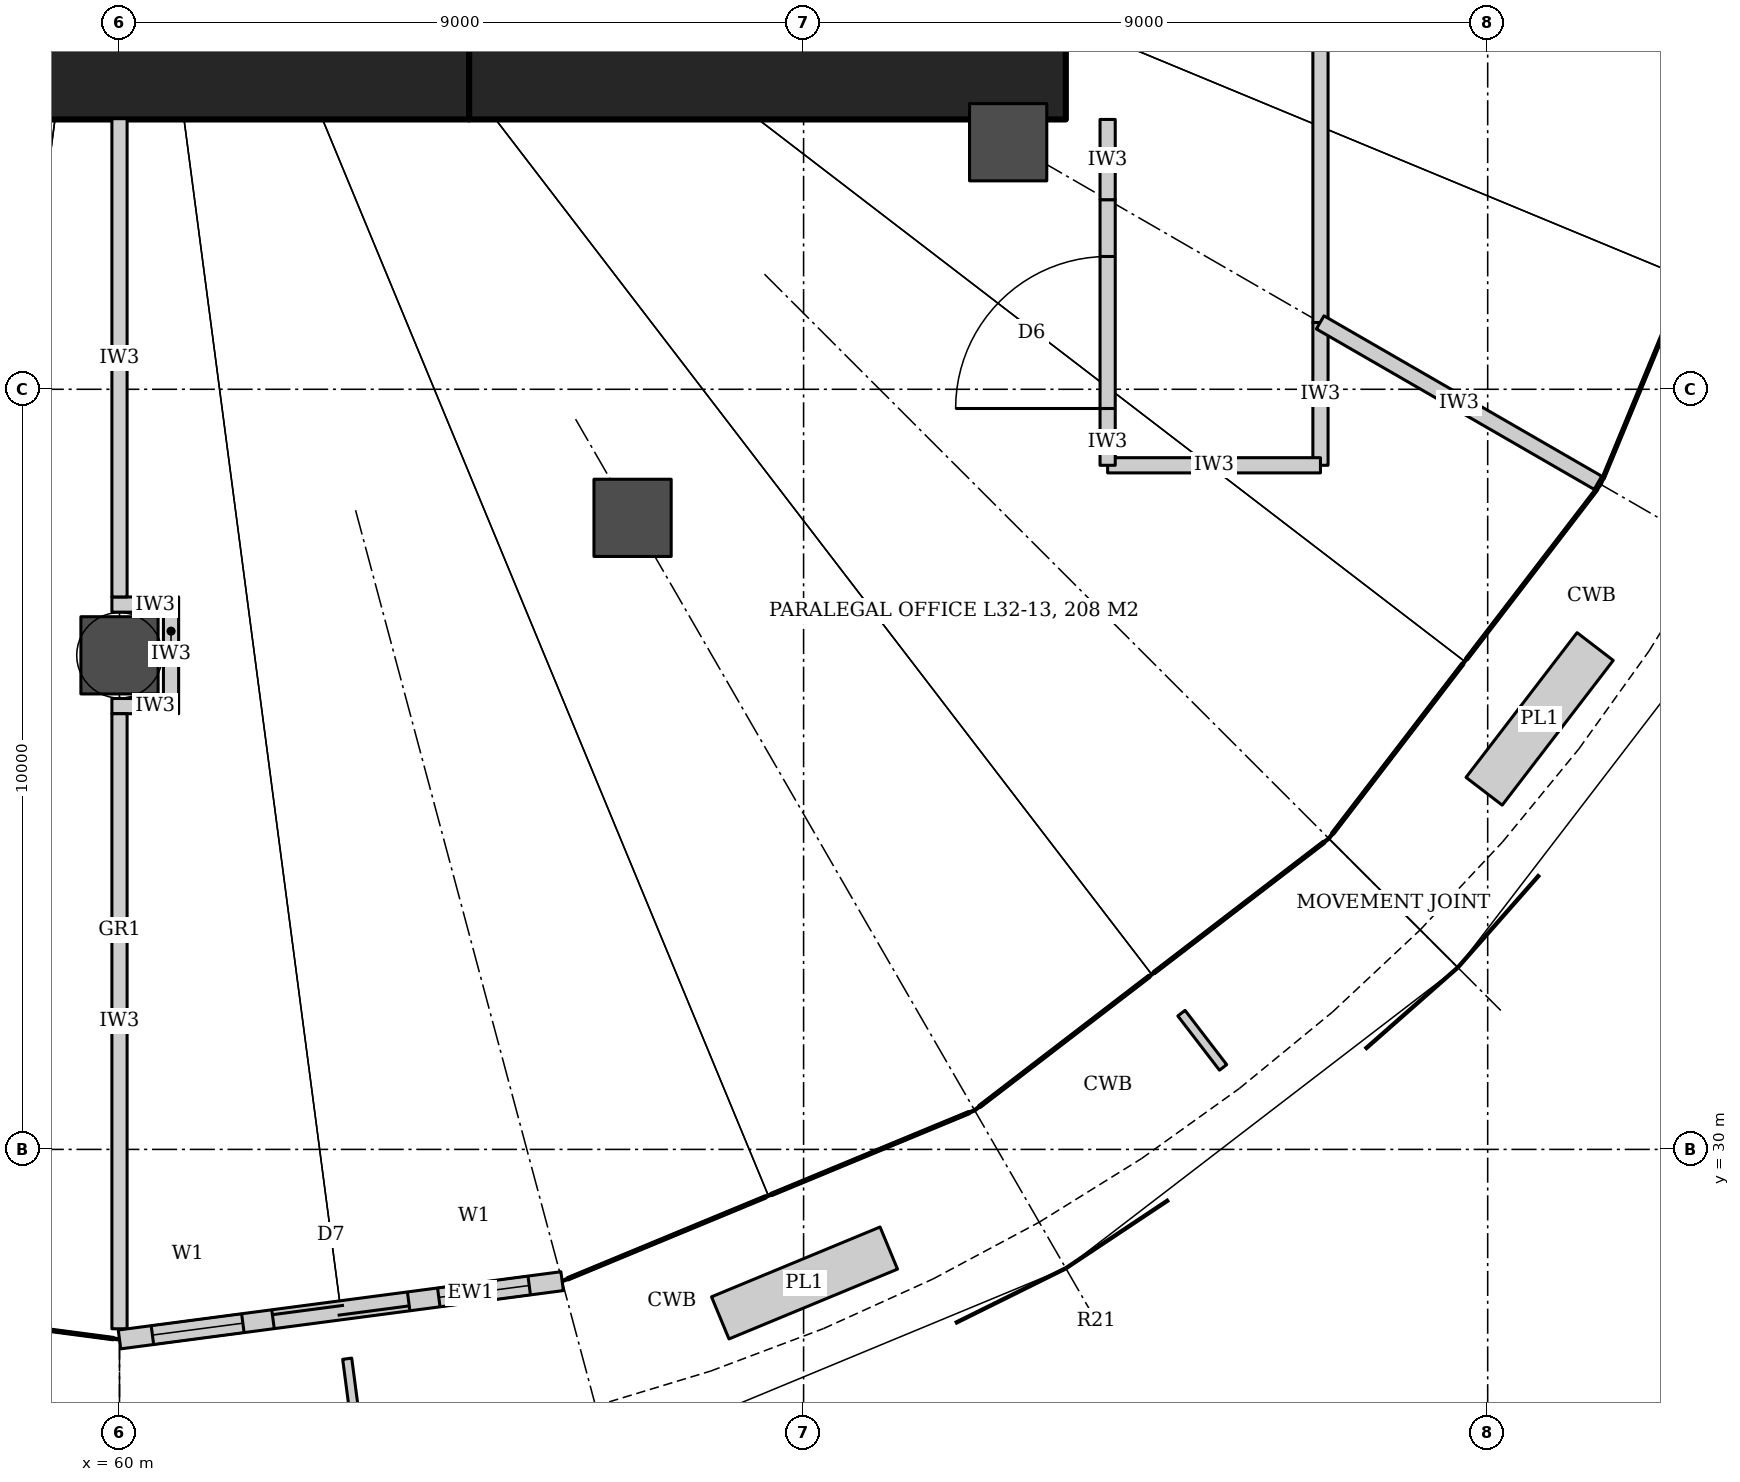
"""IFC4 building model, lengths in metres.
Left out: names, types, materials, properties, quantities, classifications, styles, units other than length and angle.
Written with IfcOpenShell. Run it as: python <this file> out.ifc"""

import sys

from ifc_helpers import new_model, si_unit, direction, frame, frame_2d, origin, origin_2d, place, context, subcontext, project, spatial, rectangle, hollow_circle, extrude, element, fill, save


model = new_model("IFC4")
c1 = context("Model", 3, precision=1e-05, world=origin(), true_north=direction((0.0, 1.0)))
c2 = subcontext(c1, "Body", "Model", "MODEL_VIEW")
j1 = project(units=[si_unit("LENGTHUNIT", "METRE"), si_unit("PLANEANGLEUNIT", "RADIAN")], contexts=[c1])
p1 = place(None, origin())
s1 = spatial("IfcSite", under=j1, at=p1, CompositionType="ELEMENT")
p2 = place(p1, origin())
s2 = spatial("IfcBuilding", under=s1, at=p2, CompositionType="ELEMENT")
p3 = place(p2, frame((0.0, 0.0, 135.2)))
s3 = spatial("IfcBuildingStorey", under=s2, at=p3, CompositionType="ELEMENT", Elevation=135.2)
p4 = place(p3, frame((55.4, 44.45, 0.0), z_axis=(0.0, 0.0, 1.0), x_axis=(1.0, 0.0, 0.0)))
e1 = element("IfcWall", 1, at=p4, inside=s3, PredefinedType="SHEAR", context=c2, shape_type="SweptSolid", body=[
    extrude(rectangle(XDim=9.2, YDim=1.8, at=frame_2d((4.6, 0.0))), origin(), (0.0, 0.0, 1.0), 4.2),
])
p5 = place(p3, frame((64.6, 44.45, 0.0), z_axis=(0.0, 0.0, 1.0), x_axis=(1.0, 0.0, 0.0)))
e2 = element("IfcWall", 2, at=p5, inside=s3, PredefinedType="SHEAR", context=c2, shape_type="SweptSolid", body=[
    extrude(rectangle(XDim=7.85, YDim=1.8, at=frame_2d((3.925, 0.0))), origin(), (0.0, 0.0, 1.0), 4.2),
])
for number, where, z_axis, x_axis in (
    (3, (60.0, 36.5, 0.0), (0.0, 0.0, 1.0), (1.0, 0.0, 0.0)),
    (4, (66.75, 38.309, 0.0), (0.0, 0.0, 1.0), (1.0, 0.0, 0.0)),
    (5, (71.691, 43.25, 0.0), (0.0, 0.0, 1.0), (1.0, 0.0, 0.0)),
):
    element("IfcColumn", number, at=place(p3, frame(where, z_axis=z_axis, x_axis=x_axis)), inside=s3, PredefinedType="COLUMN", context=c2, shape_type="SweptSolid", body=[
        extrude(hollow_circle(Radius=0.508, WallThickness=0.05, at=origin_2d()), origin(), (0.0, 0.0, 1.0), 4.2),
    ])
p6 = place(p3, frame((75.8, 50.0, 0.0), z_axis=(0.0, 0.0, 1.0), x_axis=(0.0, -1.0, 0.0)))
e6 = element("IfcWall", 6, at=p6, inside=s3, PredefinedType="PARTITIONING", context=c2, shape_type="SweptSolid", body=[
    extrude(rectangle(XDim=9.122, YDim=0.2, at=frame_2d((4.561, 0.0))), origin(), (0.0, 0.0, 1.0), 3.04),
])
p7 = place(p6, frame((4.061, 0.0, 0.0)))
e7 = element("IfcOpeningElement", 7, at=p7, cuts=e6, PredefinedType="OPENING", context=c2, shape_type="SweptSolid", body=[
    extrude(rectangle(XDim=1.0, YDim=2.1, at=frame_2d((0.5, 1.05))), frame((0.0, 0.11, 0.0), z_axis=(0.0, -1.0, 0.0), x_axis=(1.0, 0.0, 0.0)), (0.0, 0.0, 1.0), 0.22),
])
p8 = place(p3, frame((75.8, 40.878, 0.0), z_axis=(0.0, 0.0, 1.0), x_axis=(0.0, -1.0, 0.0)))
e8 = element("IfcWall", 8, at=p8, inside=s3, PredefinedType="PARTITIONING", context=c2, shape_type="SweptSolid", body=[
    extrude(rectangle(XDim=1.878, YDim=0.2, at=frame_2d((0.939, 0.0))), origin(), (0.0, 0.0, 1.0), 3.04),
])
p9 = place(p3, frame((75.8, 39.0, 0.0), z_axis=(0.0, 0.0, 1.0), x_axis=(-1.0, 0.0, 0.0)))
e9 = element("IfcWall", 9, at=p9, inside=s3, PredefinedType="PARTITIONING", context=c2, shape_type="SweptSolid", body=[
    extrude(rectangle(XDim=2.8, YDim=0.2, at=frame_2d((1.4, 0.0))), origin(), (0.0, 0.0, 1.0), 3.04),
])
p10 = place(p3, frame((73.0, 39.0, 0.0), z_axis=(0.0, 0.0, 1.0), x_axis=(0.0, 1.0, 0.0)))
e10 = element("IfcWall", 10, at=p10, inside=s3, PredefinedType="PARTITIONING", context=c2, shape_type="SweptSolid", body=[
    extrude(rectangle(XDim=3.494, YDim=0.2, at=frame_2d((1.747, 0.0))), origin(), (0.0, 0.0, 1.0), 3.04),
])
p11 = place(p10, frame((0.747, 0.0, 0.0)))
e11 = element("IfcOpeningElement", 11, at=p11, cuts=e10, PredefinedType="OPENING", context=c2, shape_type="SweptSolid", body=[
    extrude(rectangle(XDim=2.0, YDim=2.1, at=frame_2d((1.0, 1.05))), frame((0.0, 0.11, 0.0), z_axis=(0.0, -1.0, 0.0), x_axis=(1.0, 0.0, 0.0)), (0.0, 0.0, 1.0), 0.22),
])
p12 = place(p3, frame((73.0, 42.494, 0.0), z_axis=(0.0, 0.0, 1.0), x_axis=(0.0, 1.0, 0.0)))
e12 = element("IfcWall", 12, at=p12, inside=s3, PredefinedType="PARTITIONING", context=c2, shape_type="SweptSolid", body=[
    extrude(rectangle(XDim=1.056, YDim=0.2, at=frame_2d((0.528, 0.0))), origin(), (0.0, 0.0, 1.0), 3.04),
])
for number, where, z_axis, x_axis in (
    (13, (59.9, 37.168, 0.0), (0.0, 0.0, 1.0), (1.0, 0.0, 0.0)),
    (14, (59.9, 35.832, 0.0), (0.0, 0.0, 1.0), (1.0, 0.0, 0.0)),
):
    element("IfcWall", number, at=place(p3, frame(where, z_axis=z_axis, x_axis=x_axis)), inside=s3, PredefinedType="PARTITIONING", context=c2, shape_type="SweptSolid", body=[
        extrude(rectangle(XDim=0.878, YDim=0.2, at=frame_2d((0.439, 0.0))), origin(), (0.0, 0.0, 1.0), 3.02),
    ])
p13 = place(p3, frame((60.678, 37.068, 0.0), z_axis=(0.0, 0.0, 1.0), x_axis=(0.0, -1.0, 0.0)))
e15 = element("IfcWall", 15, at=p13, inside=s3, PredefinedType="PARTITIONING", context=c2, shape_type="SweptSolid", body=[
    extrude(rectangle(XDim=1.136, YDim=0.2, at=frame_2d((0.568, 0.0))), origin(), (0.0, 0.0, 1.0), 3.02),
])
p14 = place(p3, frame((60.0, 43.56, 0.0), z_axis=(0.0, 0.0, 1.0), x_axis=(0.0, -1.0, 0.0)))
e16 = element("IfcWall", 16, at=p14, inside=s3, PredefinedType="PARTITIONING", context=c2, shape_type="SweptSolid", body=[
    extrude(rectangle(XDim=6.292, YDim=0.2, at=frame_2d((3.146, 0.0))), origin(), (0.0, 0.0, 1.0), 3.04),
])
p15 = place(p3, frame((60.0, 35.732, 0.0), z_axis=(0.0, 0.0, 1.0), x_axis=(0.0, -1.0, 0.0)))
e17 = element("IfcWall", 17, at=p15, inside=s3, PredefinedType="PARTITIONING", context=c2, shape_type="SweptSolid", body=[
    extrude(rectangle(XDim=8.192, YDim=0.2, at=frame_2d((4.096, 0.0))), origin(), (0.0, 0.0, 1.0), 3.04),
])
p16 = place(p3, frame((75.796, 40.88, 0.0), z_axis=(0.0, 0.0, 1.0), x_axis=(0.866033125095, -0.499986626058, 0.0)))
e18 = element("IfcWall", 18, at=p16, inside=s3, PredefinedType="PARTITIONING", context=c2, shape_type="SweptSolid", body=[
    extrude(rectangle(XDim=4.32, YDim=0.2, at=frame_2d((2.16, 0.0))), origin(), (0.0, 0.0, 1.0), 3.04),
])
p17 = place(p3, frame((60.0, 27.4, 0.0), z_axis=(0.0, 0.0, 1.0), x_axis=(0.991440909901, 0.130556203128, 0.0)))
e19 = element("IfcWall", 19, at=p17, inside=s3, PredefinedType="SOLIDWALL", context=c2, shape_type="SweptSolid", body=[
    extrude(rectangle(XDim=5.9, YDim=0.25, at=frame_2d((2.95, 0.0))), origin(), (0.0, 0.0, 1.0), 4.04),
])
p18 = place(p17, frame((2.05, 0.0, 0.0)))
e20 = element("IfcOpeningElement", 20, at=p18, cuts=e19, PredefinedType="OPENING", context=c2, shape_type="SweptSolid", body=[
    extrude(rectangle(XDim=1.8, YDim=2.4, at=frame_2d((0.9, 1.2))), frame((0.0, 0.135, 0.0), z_axis=(0.0, -1.0, 0.0), x_axis=(1.0, 0.0, 0.0)), (0.0, 0.0, 1.0), 0.27),
])
p19 = place(p17, frame((0.45, 0.0, 0.0)))
e21 = element("IfcOpeningElement", 21, at=p19, cuts=e19, PredefinedType="OPENING", context=c2, shape_type="SweptSolid", body=[
    extrude(rectangle(XDim=1.2, YDim=2.4, at=frame_2d((0.6, 1.2))), frame((0.0, 0.135, 0.0), z_axis=(0.0, -1.0, 0.0), x_axis=(1.0, 0.0, 0.0)), (0.0, 0.0, 1.0), 0.27),
])
p20 = place(p17, frame((4.25, 0.0, 0.0)))
e22 = element("IfcOpeningElement", 22, at=p20, cuts=e19, PredefinedType="OPENING", context=c2, shape_type="SweptSolid", body=[
    extrude(rectangle(XDim=1.2, YDim=2.4, at=frame_2d((0.6, 1.2))), frame((0.0, 0.135, 0.0), z_axis=(0.0, -1.0, 0.0), x_axis=(1.0, 0.0, 0.0)), (0.0, 0.0, 1.0), 0.27),
])
p21 = place(p11, origin())
e23 = element("IfcDoor", 23, at=p21, inside=s3, OperationType="DOUBLE_DOOR_DOUBLE_SWING", PredefinedType="DOOR", context=c2, shape_type="SweptSolid", body=[
    extrude(rectangle(XDim=2.0, YDim=2.1, at=frame_2d((1.0, 1.05))), frame((0.0, 0.025, 0.0), z_axis=(0.0, -1.0, 0.0), x_axis=(1.0, 0.0, 0.0)), (0.0, 0.0, 1.0), 0.05),
])
fill(e11, e23)
p22 = place(p18, origin())
e24 = element("IfcDoor", 24, at=p22, inside=s3, OperationType="DOUBLE_DOOR_SLIDING", PredefinedType="DOOR", context=c2, shape_type="SweptSolid", body=[
    extrude(rectangle(XDim=1.8, YDim=2.4, at=frame_2d((0.9, 1.2))), frame((0.0, 0.025, 0.0), z_axis=(0.0, -1.0, 0.0), x_axis=(1.0, 0.0, 0.0)), (0.0, 0.0, 1.0), 0.05),
])
fill(e20, e24)
p23 = place(p19, origin())
e25 = element("IfcWindow", 25, at=p23, inside=s3, PartitioningType="SINGLE_PANEL", PredefinedType="WINDOW", context=c2, shape_type="SweptSolid", body=[
    extrude(rectangle(XDim=1.2, YDim=2.4, at=frame_2d((0.6, 1.2))), frame((0.0, 0.03, 0.0), z_axis=(0.0, -1.0, 0.0), x_axis=(1.0, 0.0, 0.0)), (0.0, 0.0, 1.0), 0.06),
])
fill(e21, e25)
p24 = place(p20, origin())
e26 = element("IfcWindow", 26, at=p24, inside=s3, PartitioningType="SINGLE_PANEL", PredefinedType="WINDOW", context=c2, shape_type="SweptSolid", body=[
    extrude(rectangle(XDim=1.2, YDim=2.4, at=frame_2d((0.6, 1.2))), frame((0.0, 0.03, 0.0), z_axis=(0.0, -1.0, 0.0), x_axis=(1.0, 0.0, 0.0)), (0.0, 0.0, 1.0), 0.06),
])
fill(e22, e26)
save(model, sys.argv[1])
